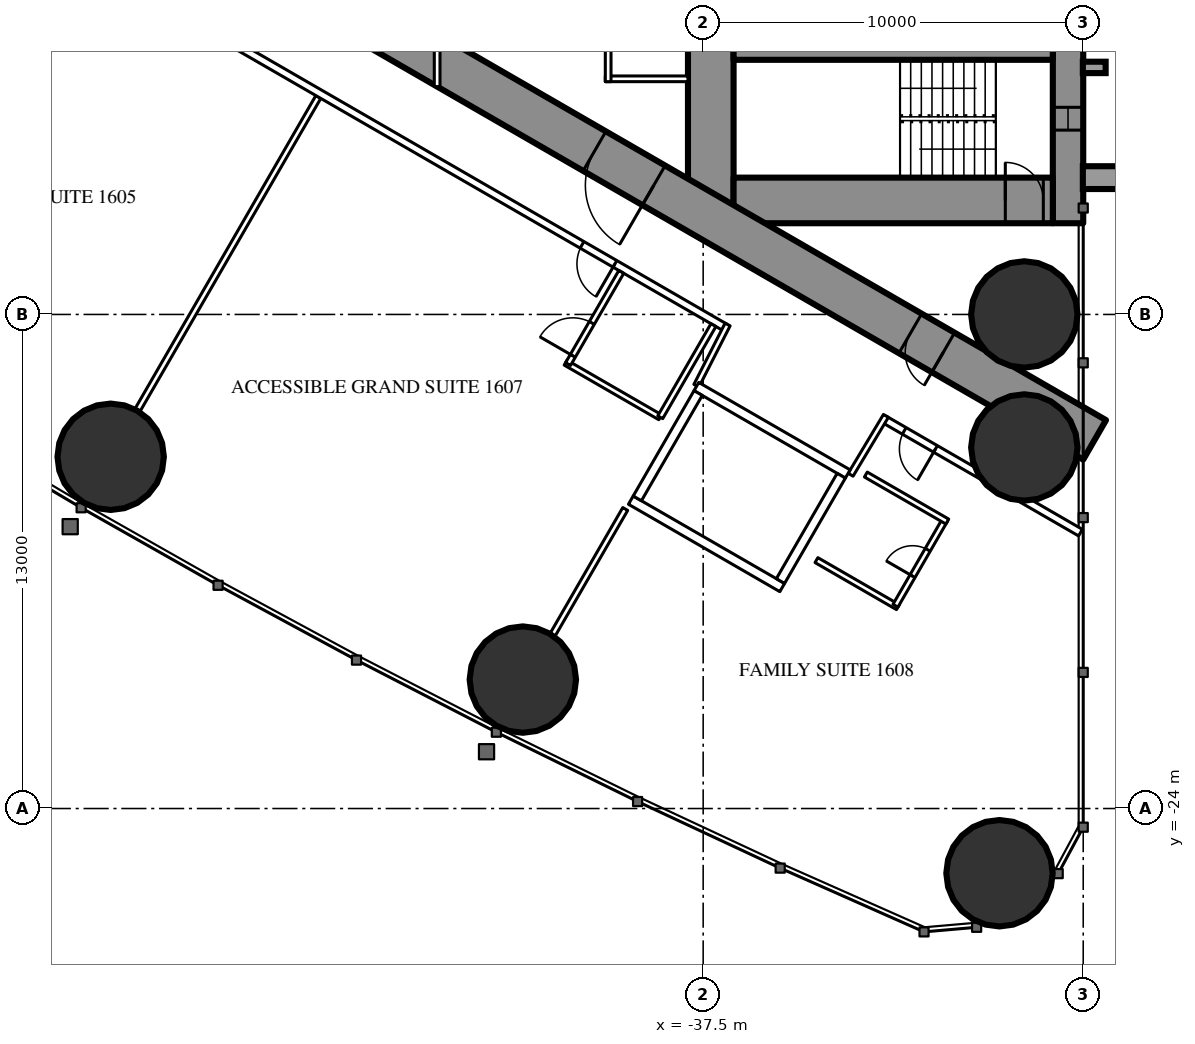
"""IFC4 building model, lengths in metres.
Left out: names, types, materials, properties, quantities, classifications, styles, units other than length and angle.
Written with IfcOpenShell. Run it as: python <this file> out.ifc"""

import sys

from ifc_helpers import new_model, si_unit, direction, frame, frame_2d, origin, origin_2d, place, context, subcontext, project, spatial, rectangle, hollow_circle, extrude, element, fill, save


model = new_model("IFC4")
c1 = context("Model", 3, precision=1e-05, world=origin(), true_north=direction((0.0, 1.0)))
c2 = subcontext(c1, "Body", "Model", "MODEL_VIEW")
j1 = project(units=[si_unit("LENGTHUNIT", "METRE"), si_unit("PLANEANGLEUNIT", "RADIAN")], contexts=[c1])
p1 = place(None, origin())
s1 = spatial("IfcSite", under=j1, at=p1, CompositionType="ELEMENT")
p2 = place(p1, origin())
s2 = spatial("IfcBuilding", under=s1, at=p2, CompositionType="ELEMENT")
p3 = place(p2, frame((0.0, 0.0, 63.5)))
s3 = spatial("IfcBuildingStorey", under=s2, at=p3, CompositionType="ELEMENT", Elevation=63.5)
for number, where, z_axis, x_axis in (
    (1, (-29.703, -25.703, 0.0), (0.0, 0.0, 1.0), (1.0, 0.0, 0.0)),
    (2, (-29.05, -11.0, 0.0), (0.0, 0.0, 1.0), (1.0, 0.0, 0.0)),
    (3, (-29.05, -14.5, 0.0), (0.0, 0.0, 1.0), (1.0, 0.0, 0.0)),
    (4, (-53.09, -14.745, 0.0), (0.0, 0.0, 1.0), (1.0, 0.0, 0.0)),
    (5, (-42.245, -20.607, 0.0), (0.0, 0.0, 1.0), (1.0, 0.0, 0.0)),
):
    element("IfcColumn", number, at=place(p3, frame(where, z_axis=z_axis, x_axis=x_axis)), inside=s3, PredefinedType="COLUMN", context=c2, shape_type="SweptSolid", body=[
        extrude(hollow_circle(Radius=1.4, WallThickness=0.12, at=origin_2d()), origin(), (0.0, 0.0, 1.0), 3.5),
    ])
p4 = place(p3, frame((-27.9, 8.6, 0.0), z_axis=(0.0, 0.0, 1.0), x_axis=(0.0, -1.0, 0.0)))
e6 = element("IfcWall", 6, at=p4, inside=s3, PredefinedType="SHEAR", context=c2, shape_type="SweptSolid", body=[
    extrude(rectangle(XDim=17.2, YDim=0.8, at=frame_2d((8.6, 0.0))), origin(), (0.0, 0.0, 1.0), 3.5),
])
p5 = place(p4, frame((2.45, 0.0, 0.6)))
e7 = element("IfcOpeningElement", 7, at=p5, cuts=e6, PredefinedType="OPENING", context=c2, shape_type="SweptSolid", body=[
    extrude(rectangle(XDim=0.6, YDim=2.1, at=frame_2d((0.3, 1.05))), frame((0.0, 0.41, 0.0), z_axis=(0.0, -1.0, 0.0), x_axis=(1.0, 0.0, 0.0)), (0.0, 0.0, 1.0), 0.82),
])
p6 = place(p4, frame((14.15, 0.0, 0.6)))
e8 = element("IfcOpeningElement", 8, at=p6, cuts=e6, PredefinedType="OPENING", context=c2, shape_type="SweptSolid", body=[
    extrude(rectangle(XDim=0.6, YDim=2.1, at=frame_2d((0.3, 1.05))), frame((0.0, 0.41, 0.0), z_axis=(0.0, -1.0, 0.0), x_axis=(1.0, 0.0, 0.0)), (0.0, 0.0, 1.0), 0.82),
])
p7 = place(p3, frame((-37.3, 8.6, 0.0), z_axis=(0.0, 0.0, 1.0), x_axis=(0.0, -1.0, 0.0)))
e9 = element("IfcWall", 9, at=p7, inside=s3, PredefinedType="SHEAR", context=c2, shape_type="SweptSolid", body=[
    extrude(rectangle(XDim=17.2, YDim=1.2, at=frame_2d((8.6, 0.0))), origin(), (0.0, 0.0, 1.0), 3.5),
])
p8 = place(p7, frame((7.7, 0.0, 0.0)))
e10 = element("IfcOpeningElement", 10, at=p8, cuts=e9, PredefinedType="OPENING", context=c2, shape_type="SweptSolid", body=[
    extrude(rectangle(XDim=1.8, YDim=2.2, at=frame_2d((0.9, 1.1))), frame((0.0, 0.61, 0.0), z_axis=(0.0, -1.0, 0.0), x_axis=(1.0, 0.0, 0.0)), (0.0, 0.0, 1.0), 1.22),
])
p9 = place(p3, frame((-28.3, -8.0, 0.0), z_axis=(0.0, 0.0, 1.0), x_axis=(-1.0, 0.0, 0.0)))
e11 = element("IfcWall", 11, at=p9, inside=s3, PredefinedType="SHEAR", context=c2, shape_type="SweptSolid", body=[
    extrude(rectangle(XDim=8.4, YDim=1.2, at=frame_2d((4.2, 0.0))), origin(), (0.0, 0.0, 1.0), 3.5),
])
p10 = place(p9, frame((0.25, 0.0, 0.0)))
e12 = element("IfcOpeningElement", 12, at=p10, cuts=e11, PredefinedType="OPENING", context=c2, shape_type="SweptSolid", body=[
    extrude(rectangle(XDim=1.0, YDim=2.2, at=frame_2d((0.5, 1.1))), frame((0.0, 0.61, 0.0), z_axis=(0.0, -1.0, 0.0), x_axis=(1.0, 0.0, 0.0)), (0.0, 0.0, 1.0), 1.22),
])
p11 = place(p3, frame((-28.3, -4.15, 0.0), z_axis=(0.0, 0.0, 1.0), x_axis=(-1.0, 0.0, 0.0)))
e13 = element("IfcWall", 13, at=p11, inside=s3, PredefinedType="SHEAR", context=c2, shape_type="SweptSolid", body=[
    extrude(rectangle(XDim=8.4, YDim=0.3, at=frame_2d((4.2, 0.0))), origin(), (0.0, 0.0, 1.0), 3.5),
])
p12 = place(p3, frame((-27.2, -14.3, 0.0), z_axis=(0.0, 0.0, 1.0), x_axis=(-0.866024021859, 0.500002393557, 0.0)))
e14 = element("IfcWall", 14, at=p12, inside=s3, PredefinedType="SHEAR", context=c2, shape_type="SweptSolid", body=[
    extrude(rectangle(XDim=27.907, YDim=1.2, at=frame_2d((13.954, 0.0))), origin(), (0.0, 0.0, 1.0), 3.5),
])
p13 = place(p12, frame((4.6, 0.0, 0.0)))
e15 = element("IfcOpeningElement", 15, at=p13, cuts=e14, PredefinedType="OPENING", context=c2, shape_type="SweptSolid", body=[
    extrude(rectangle(XDim=1.0, YDim=2.2, at=frame_2d((0.5, 1.1))), frame((0.0, 0.61, 0.0), z_axis=(0.0, -1.0, 0.0), x_axis=(1.0, 0.0, 0.0)), (0.0, 0.0, 1.0), 1.22),
])
p14 = place(p12, frame((13.395, 0.0, 0.0)))
e16 = element("IfcOpeningElement", 16, at=p14, cuts=e14, PredefinedType="OPENING", context=c2, shape_type="SweptSolid", body=[
    extrude(rectangle(XDim=1.8, YDim=2.2, at=frame_2d((0.9, 1.1))), frame((0.0, 0.61, 0.0), z_axis=(0.0, -1.0, 0.0), x_axis=(1.0, 0.0, 0.0)), (0.0, 0.0, 1.0), 1.22),
])
p15 = place(p3, frame((-47.627, -5.278, 0.0), z_axis=(0.0, 0.0, 1.0), x_axis=(-0.500009844318, -0.86601972009, 0.0)))
e17 = element("IfcWall", 17, at=p15, inside=s3, PredefinedType="PARTITIONING", context=c2, shape_type="SweptSolid", body=[
    extrude(rectangle(XDim=9.51, YDim=0.15, at=frame_2d((4.755, 0.0))), origin(), (0.0, 0.0, 1.0), 2.25),
])
p16 = place(p3, frame((-39.551, -16.118, 0.0), z_axis=(0.0, 0.0, 1.0), x_axis=(-0.499986503906, -0.866033195618, 0.0)))
e18 = element("IfcWall", 18, at=p16, inside=s3, PredefinedType="PARTITIONING", context=c2, shape_type="SweptSolid", body=[
    extrude(rectangle(XDim=3.815, YDim=0.15, at=frame_2d((1.907, 0.0))), origin(), (0.0, 0.0, 1.0), 3.25),
])
p17 = place(p3, frame((-27.572, -16.741, 0.0), z_axis=(0.0, 0.0, 1.0), x_axis=(-0.866024464444, 0.500001626982, 0.0)))
e19 = element("IfcWall", 19, at=p17, inside=s3, PredefinedType="PARTITIONING", context=c2, shape_type="SweptSolid", body=[
    extrude(rectangle(XDim=5.955, YDim=0.2, at=frame_2d((2.978, 0.0))), origin(), (0.0, 0.0, 1.0), 3.25),
])
p18 = place(p17, frame((4.405, 0.0, 0.0)))
e20 = element("IfcOpeningElement", 20, at=p18, cuts=e19, PredefinedType="OPENING", context=c2, shape_type="SweptSolid", body=[
    extrude(rectangle(XDim=0.95, YDim=2.2, at=frame_2d((0.475, 1.1))), frame((0.0, 0.11, 0.0), z_axis=(0.0, -1.0, 0.0), x_axis=(1.0, 0.0, 0.0)), (0.0, 0.0, 1.0), 0.22),
])
p19 = place(p3, frame((-36.92, -11.344, 0.0), z_axis=(0.0, 0.0, 1.0), x_axis=(-0.866028313256, 0.499994960614, 0.0)))
e21 = element("IfcWall", 21, at=p19, inside=s3, PredefinedType="PARTITIONING", context=c2, shape_type="SweptSolid", body=[
    extrude(rectangle(XDim=22.568, YDim=0.2, at=frame_2d((11.284, 0.0))), origin(), (0.0, 0.0, 1.0), 3.25),
])
p20 = place(p19, frame((18.668, 0.0, 0.0)))
e22 = element("IfcOpeningElement", 22, at=p20, cuts=e21, PredefinedType="OPENING", context=c2, shape_type="SweptSolid", body=[
    extrude(rectangle(XDim=0.95, YDim=2.2, at=frame_2d((0.475, 1.1))), frame((0.0, 0.11, 0.0), z_axis=(0.0, -1.0, 0.0), x_axis=(1.0, 0.0, 0.0)), (0.0, 0.0, 1.0), 0.22),
])
p21 = place(p19, frame((3.35, 0.0, 0.0)))
e23 = element("IfcOpeningElement", 23, at=p21, cuts=e21, PredefinedType="OPENING", context=c2, shape_type="SweptSolid", body=[
    extrude(rectangle(XDim=1.0, YDim=2.2, at=frame_2d((0.5, 1.1))), frame((0.0, 0.11, 0.0), z_axis=(0.0, -1.0, 0.0), x_axis=(1.0, 0.0, 0.0)), (0.0, 0.0, 1.0), 0.22),
])
p22 = place(p3, frame((-36.857, -11.265, 0.0), z_axis=(0.0, 0.0, 1.0), x_axis=(-0.454225294761, -0.890886851176, 0.0)))
e24 = element("IfcWall", 24, at=p22, inside=s3, PredefinedType="PARTITIONING", context=c2, shape_type="SweptSolid", body=[
    extrude(rectangle(XDim=1.807, YDim=0.15, at=frame_2d((0.904, 0.0))), origin(), (0.0, 0.0, 1.0), 3.25),
])
p23 = place(p3, frame((-33.621, -15.218, 0.0), z_axis=(0.0, 0.0, 1.0), x_axis=(0.514336634837, 0.857588377991, 0.0)))
e25 = element("IfcWall", 25, at=p23, inside=s3, PredefinedType="PARTITIONING", context=c2, shape_type="SweptSolid", body=[
    extrude(rectangle(XDim=1.805, YDim=0.15, at=frame_2d((0.903, 0.0))), origin(), (0.0, 0.0, 1.0), 3.25),
])
p24 = place(p3, frame((-38.63, -13.705, 0.0), z_axis=(0.0, 0.0, 1.0), x_axis=(-0.866018712932, 0.500011588718, 0.0)))
e26 = element("IfcWall", 26, at=p24, inside=s3, PredefinedType="PARTITIONING", context=c2, shape_type="SweptSolid", body=[
    extrude(rectangle(XDim=2.875, YDim=0.15, at=frame_2d((1.438, 0.0))), origin(), (0.0, 0.0, 1.0), 3.25),
])
p25 = place(p3, frame((-39.655, -9.88, 0.0), z_axis=(0.0, 0.0, 1.0), x_axis=(-0.500049511043, -0.865996816683, 0.0)))
e27 = element("IfcWall", 27, at=p25, inside=s3, PredefinedType="PARTITIONING", context=c2, shape_type="SweptSolid", body=[
    extrude(rectangle(XDim=2.8, YDim=0.15, at=frame_2d((1.4, 0.0))), origin(), (0.0, 0.0, 1.0), 3.25),
])
p26 = place(p25, frame((1.55, 0.0, 0.0)))
e28 = element("IfcOpeningElement", 28, at=p26, cuts=e27, PredefinedType="OPENING", context=c2, shape_type="SweptSolid", body=[
    extrude(rectangle(XDim=1.0, YDim=2.2, at=frame_2d((0.5, 1.1))), frame((0.0, 0.085, 0.0), z_axis=(0.0, -1.0, 0.0), x_axis=(1.0, 0.0, 0.0)), (0.0, 0.0, 1.0), 0.17),
])
p27 = place(p3, frame((-37.23, -11.281, 0.0), z_axis=(0.0, 0.0, 1.0), x_axis=(-0.500049511043, -0.865996816683, 0.0)))
e29 = element("IfcWall", 29, at=p27, inside=s3, PredefinedType="PARTITIONING", context=c2, shape_type="SweptSolid", body=[
    extrude(rectangle(XDim=2.8, YDim=0.15, at=frame_2d((1.4, 0.0))), origin(), (0.0, 0.0, 1.0), 3.25),
])
p28 = place(p3, frame((-32.376, -18.702, 0.0), z_axis=(0.0, 0.0, 1.0), x_axis=(-0.866006523861, 0.500032699561, 0.0)))
e30 = element("IfcWall", 30, at=p28, inside=s3, PredefinedType="PARTITIONING", context=c2, shape_type="SweptSolid", body=[
    extrude(rectangle(XDim=2.475, YDim=0.15, at=frame_2d((1.237, 0.0))), origin(), (0.0, 0.0, 1.0), 3.25),
])
p29 = place(p3, frame((-31.141, -16.413, 0.0), z_axis=(0.0, 0.0, 1.0), x_axis=(-0.500006934395, -0.866021400173, 0.0)))
e31 = element("IfcWall", 31, at=p29, inside=s3, PredefinedType="PARTITIONING", context=c2, shape_type="SweptSolid", body=[
    extrude(rectangle(XDim=2.6, YDim=0.15, at=frame_2d((1.3, 0.0))), origin(), (0.0, 0.0, 1.0), 3.25),
])
p30 = place(p29, frame((0.9, 0.0, 0.0)))
e32 = element("IfcOpeningElement", 32, at=p30, cuts=e31, PredefinedType="OPENING", context=c2, shape_type="SweptSolid", body=[
    extrude(rectangle(XDim=0.8, YDim=2.2, at=frame_2d((0.4, 1.1))), frame((0.0, 0.085, 0.0), z_axis=(0.0, -1.0, 0.0), x_axis=(1.0, 0.0, 0.0)), (0.0, 0.0, 1.0), 0.17),
])
p31 = place(p3, frame((-31.076, -16.45, 0.0), z_axis=(0.0, 0.0, 1.0), x_axis=(-0.866073894602, 0.499916002032, 0.0)))
e33 = element("IfcWall", 33, at=p31, inside=s3, PredefinedType="PARTITIONING", context=c2, shape_type="SweptSolid", body=[
    extrude(rectangle(XDim=2.475, YDim=0.15, at=frame_2d((1.238, 0.0))), origin(), (0.0, 0.0, 1.0), 3.25),
])
p32 = place(p3, frame((-37.9, -4.8, 0.0), z_axis=(0.0, 0.0, 1.0), x_axis=(-1.0, 0.0, 0.0)))
e34 = element("IfcWall", 34, at=p32, inside=s3, PredefinedType="PARTITIONING", context=c2, shape_type="SweptSolid", body=[
    extrude(rectangle(XDim=2.175, YDim=0.15, at=frame_2d((1.087, 0.0))), origin(), (0.0, 0.0, 1.0), 3.25),
])
p33 = place(p3, frame((-40.0, -1.125, 0.0), z_axis=(0.0, 0.0, 1.0), x_axis=(0.0, -1.0, 0.0)))
e35 = element("IfcWall", 35, at=p33, inside=s3, PredefinedType="PARTITIONING", context=c2, shape_type="SweptSolid", body=[
    extrude(rectangle(XDim=3.75, YDim=0.15, at=frame_2d((1.875, 0.0))), origin(), (0.0, 0.0, 1.0), 3.25),
])
p34 = place(p33, frame((1.375, 0.0, 0.0)))
e36 = element("IfcOpeningElement", 36, at=p34, cuts=e35, PredefinedType="OPENING", context=c2, shape_type="SweptSolid", body=[
    extrude(rectangle(XDim=1.0, YDim=2.2, at=frame_2d((0.5, 1.1))), frame((0.0, 0.085, 0.0), z_axis=(0.0, -1.0, 0.0), x_axis=(1.0, 0.0, 0.0)), (0.0, 0.0, 1.0), 0.17),
])
p35 = place(p3, frame((-44.5, 5.005, 0.0), z_axis=(0.0, 0.0, 1.0), x_axis=(0.0, -1.0, 0.0)))
e37 = element("IfcWall", 37, at=p35, inside=s3, PredefinedType="PARTITIONING", context=c2, shape_type="SweptSolid", body=[
    extrude(rectangle(XDim=10.009, YDim=0.15, at=frame_2d((5.005, 0.0))), origin(), (0.0, 0.0, 1.0), 2.45),
])
p36 = place(p35, frame((2.002, 0.0, 0.0)))
e38 = element("IfcOpeningElement", 38, at=p36, cuts=e37, PredefinedType="OPENING", context=c2, shape_type="SweptSolid", body=[
    extrude(rectangle(XDim=1.0, YDim=2.2, at=frame_2d((0.5, 1.1))), frame((0.0, 0.085, 0.0), z_axis=(0.0, -1.0, 0.0), x_axis=(1.0, 0.0, 0.0)), (0.0, 0.0, 1.0), 0.17),
])
p37 = place(p35, frame((7.007, 0.0, 0.0)))
e39 = element("IfcOpeningElement", 39, at=p37, cuts=e37, PredefinedType="OPENING", context=c2, shape_type="SweptSolid", body=[
    extrude(rectangle(XDim=1.0, YDim=2.2, at=frame_2d((0.5, 1.1))), frame((0.0, 0.085, 0.0), z_axis=(0.0, -1.0, 0.0), x_axis=(1.0, 0.0, 0.0)), (0.0, 0.0, 1.0), 0.17),
])
p38 = place(p3, frame((-33.696, -15.197, 0.0), z_axis=(0.0, 0.0, 1.0), x_axis=(-0.865976953817, 0.500083908417, 0.0)))
e40 = element("IfcWall", 40, at=p38, inside=s3, PredefinedType="PARTITIONING", context=c2, shape_type="SweptSolid", body=[
    extrude(rectangle(XDim=4.599, YDim=0.25, at=frame_2d((2.3, 0.0))), origin(), (0.0, 0.0, 1.0), 3.25),
])
p39 = place(p3, frame((-35.42, -18.186, 0.0), z_axis=(0.0, 0.0, 1.0), x_axis=(-0.865990227814, 0.50006092162, 0.0)))
e41 = element("IfcWall", 41, at=p39, inside=s3, PredefinedType="PARTITIONING", context=c2, shape_type="SweptSolid", body=[
    extrude(rectangle(XDim=4.6, YDim=0.25, at=frame_2d((2.3, 0.0))), origin(), (0.0, 0.0, 1.0), 3.25),
])
p40 = place(p3, frame((-33.866, -15.243, 0.0), z_axis=(0.0, 0.0, 1.0), x_axis=(-0.499929347863, -0.866066190972, 0.0)))
e42 = element("IfcWall", 42, at=p40, inside=s3, PredefinedType="PARTITIONING", context=c2, shape_type="SweptSolid", body=[
    extrude(rectangle(XDim=3.201, YDim=0.25, at=frame_2d((1.6, 0.0))), origin(), (0.0, 0.0, 1.0), 3.25),
])
p41 = place(p3, frame((-37.633, -13.068, 0.0), z_axis=(0.0, 0.0, 1.0), x_axis=(-0.499872130319, -0.866099216793, 0.0)))
e43 = element("IfcWall", 43, at=p41, inside=s3, PredefinedType="PARTITIONING", context=c2, shape_type="SweptSolid", body=[
    extrude(rectangle(XDim=3.2, YDim=0.25, at=frame_2d((1.6, 0.0))), origin(), (0.0, 0.0, 1.0), 3.25),
])
p42 = place(p26, origin())
e44 = element("IfcDoor", 44, at=p42, inside=s3, OperationType="SINGLE_SWING_RIGHT", PredefinedType="DOOR", context=c2, shape_type="SweptSolid", body=[
    extrude(rectangle(XDim=1.0, YDim=2.2, at=frame_2d((0.5, 1.1))), frame((0.0, 0.025, 0.0), z_axis=(0.0, -1.0, 0.0), x_axis=(1.0, 0.0, 0.0)), (0.0, 0.0, 1.0), 0.05),
])
fill(e28, e44)
p43 = place(p21, origin())
e45 = element("IfcDoor", 45, at=p43, inside=s3, OperationType="SINGLE_SWING_LEFT", PredefinedType="DOOR", context=c2, shape_type="SweptSolid", body=[
    extrude(rectangle(XDim=1.0, YDim=2.2, at=frame_2d((0.5, 1.1))), frame((0.0, 0.025, 0.0), z_axis=(0.0, -1.0, 0.0), x_axis=(1.0, 0.0, 0.0)), (0.0, 0.0, 1.0), 0.05),
])
fill(e23, e45)
p44 = place(p30, origin())
e46 = element("IfcDoor", 46, at=p44, inside=s3, OperationType="SINGLE_SWING_RIGHT", PredefinedType="DOOR", context=c2, shape_type="SweptSolid", body=[
    extrude(rectangle(XDim=0.8, YDim=2.2, at=frame_2d((0.4, 1.1))), frame((0.0, 0.025, 0.0), z_axis=(0.0, -1.0, 0.0), x_axis=(1.0, 0.0, 0.0)), (0.0, 0.0, 1.0), 0.05),
])
fill(e32, e46)
p45 = place(p18, origin())
e47 = element("IfcDoor", 47, at=p45, inside=s3, OperationType="SINGLE_SWING_LEFT", PredefinedType="DOOR", context=c2, shape_type="SweptSolid", body=[
    extrude(rectangle(XDim=0.95, YDim=2.2, at=frame_2d((0.475, 1.1))), frame((0.0, 0.025, 0.0), z_axis=(0.0, -1.0, 0.0), x_axis=(1.0, 0.0, 0.0)), (0.0, 0.0, 1.0), 0.05),
])
fill(e20, e47)
p46 = place(p13, origin())
e48 = element("IfcDoor", 48, at=p46, inside=s3, OperationType="SINGLE_SWING_LEFT", PredefinedType="DOOR", context=c2, shape_type="SweptSolid", body=[
    extrude(rectangle(XDim=1.0, YDim=2.2, at=frame_2d((0.5, 1.1))), frame((0.0, 0.025, 0.0), z_axis=(0.0, -1.0, 0.0), x_axis=(1.0, 0.0, 0.0)), (0.0, 0.0, 1.0), 0.05),
])
fill(e15, e48)
p47 = place(p14, origin())
e49 = element("IfcDoor", 49, at=p47, inside=s3, OperationType="DOUBLE_DOOR_SINGLE_SWING", PredefinedType="DOOR", context=c2, shape_type="SweptSolid", body=[
    extrude(rectangle(XDim=1.8, YDim=2.2, at=frame_2d((0.9, 1.1))), frame((0.0, 0.025, 0.0), z_axis=(0.0, -1.0, 0.0), x_axis=(1.0, 0.0, 0.0)), (0.0, 0.0, 1.0), 0.05),
])
fill(e16, e49)
p48 = place(p10, origin())
e50 = element("IfcDoor", 50, at=p48, inside=s3, OperationType="SINGLE_SWING_RIGHT", PredefinedType="DOOR", context=c2, shape_type="SweptSolid", body=[
    extrude(rectangle(XDim=1.0, YDim=2.2, at=frame_2d((0.5, 1.1))), frame((0.0, 0.025, 0.0), z_axis=(0.0, -1.0, 0.0), x_axis=(1.0, 0.0, 0.0)), (0.0, 0.0, 1.0), 0.05),
])
fill(e12, e50)
p49 = place(p6, origin())
e51 = element("IfcWindow", 51, at=p49, inside=s3, PartitioningType="SINGLE_PANEL", PredefinedType="WINDOW", context=c2, shape_type="SweptSolid", body=[
    extrude(rectangle(XDim=0.6, YDim=2.1, at=frame_2d((0.3, 1.05))), frame((0.0, 0.03, 0.0), z_axis=(0.0, -1.0, 0.0), x_axis=(1.0, 0.0, 0.0)), (0.0, 0.0, 1.0), 0.06),
])
fill(e8, e51)
save(model, sys.argv[1])
